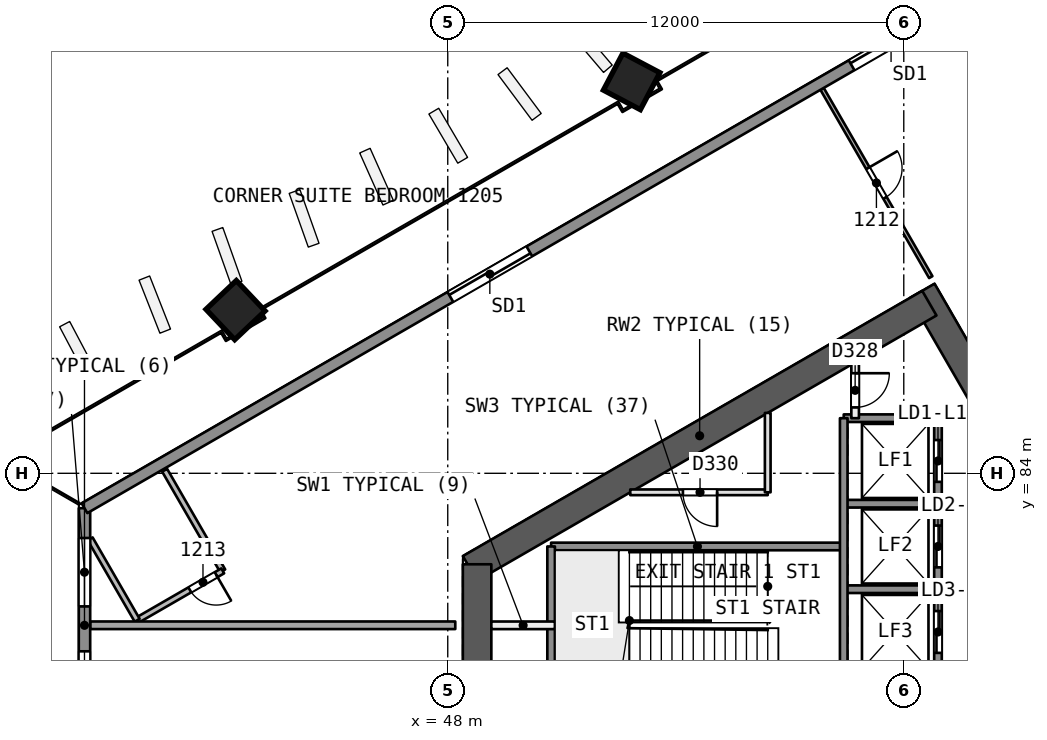
"""IFC4 building model, lengths in metres.
Left out: names, types, materials, properties, quantities, classifications, styles, units other than length and angle.
Written with IfcOpenShell. Run it as: python <this file> out.ifc"""

import sys

from ifc_helpers import new_model, si_unit, direction, frame, frame_2d, origin, origin_2d, place, context, subcontext, project, spatial, rectangle, extrude, element, fill, save


model = new_model("IFC4")
c1 = context("Model", 3, precision=1e-05, world=origin(), true_north=direction((0.0, 1.0)))
c2 = subcontext(c1, "Body", "Model", "MODEL_VIEW")
j1 = project(units=[si_unit("LENGTHUNIT", "METRE"), si_unit("PLANEANGLEUNIT", "RADIAN")], contexts=[c1])
p1 = place(None, origin())
s1 = spatial("IfcSite", under=j1, at=p1, CompositionType="ELEMENT")
p2 = place(p1, origin())
s2 = spatial("IfcBuilding", under=s1, at=p2, CompositionType="ELEMENT")
p3 = place(p2, frame((0.0, 0.0, 57.3)))
s3 = spatial("IfcBuildingStorey", under=s2, at=p3, CompositionType="ELEMENT", Elevation=57.3)
p4 = place(p3, frame((65.567, 80.0, 0.0), z_axis=(0.0, 0.0, 1.0), x_axis=(-0.499988615364, 0.866031976607, 0.0)))
e1 = element("IfcWall", 1, at=p4, inside=s3, PredefinedType="SHEAR", context=c2, shape_type="SweptSolid", body=[
    extrude(rectangle(XDim=10.163, YDim=0.75, at=frame_2d((5.082, 0.0))), origin(), (0.0, 0.0, 1.0), 3.7),
])
p5 = place(p4, frame((0.733, 0.0, 0.0)))
e2 = element("IfcOpeningElement", 2, at=p5, cuts=e1, PredefinedType="OPENING", context=c2, shape_type="SweptSolid", body=[
    extrude(rectangle(XDim=1.2, YDim=2.1, at=frame_2d((0.6, 1.05))), frame((0.0, 0.385, 0.0), z_axis=(0.0, -1.0, 0.0), x_axis=(1.0, 0.0, 0.0)), (0.0, 0.0, 1.0), 0.771),
])
p6 = place(p3, frame((60.673, 88.477, 0.0), z_axis=(0.0, 0.0, 1.0), x_axis=(-0.8660248072, -0.500001033313, 0.0)))
e3 = element("IfcWall", 3, at=p6, inside=s3, PredefinedType="SHEAR", context=c2, shape_type="SweptSolid", body=[
    extrude(rectangle(XDim=13.958, YDim=0.75, at=frame_2d((6.979, 0.0))), origin(), (0.0, 0.0, 1.0), 3.7),
])
p7 = place(p3, frame((48.772, 81.606, 0.0), z_axis=(0.0, 0.0, 1.0), x_axis=(0.0, -1.0, 0.0)))
e4 = element("IfcWall", 4, at=p7, inside=s3, PredefinedType="SHEAR", context=c2, shape_type="SweptSolid", body=[
    extrude(rectangle(XDim=3.429, YDim=0.75, at=frame_2d((1.714, 0.0))), origin(), (0.0, 0.0, 1.0), 3.7),
])
p8 = place(p3, frame((60.673, 71.523, 0.0), z_axis=(0.0, 0.0, 1.0), x_axis=(0.499997052475, 0.866027105532, 0.0)))
e5 = element("IfcWall", 5, at=p8, inside=s3, PredefinedType="SHEAR", context=c2, shape_type="SweptSolid", body=[
    extrude(rectangle(XDim=10.005, YDim=0.75, at=frame_2d((5.002, 0.0))), origin(), (0.0, 0.0, 1.0), 3.7),
])
p9 = place(p8, frame((7.855, 0.0, 0.0)))
e6 = element("IfcOpeningElement", 6, at=p9, cuts=e5, PredefinedType="OPENING", context=c2, shape_type="SweptSolid", body=[
    extrude(rectangle(XDim=1.2, YDim=2.1, at=frame_2d((0.6, 1.05))), frame((0.0, 0.385, 0.0), z_axis=(0.0, -1.0, 0.0), x_axis=(1.0, 0.0, 0.0)), (0.0, 0.0, 1.0), 0.771),
])
p10 = place(p3, frame((52.816, 94.326, 0.0), z_axis=(0.019328516974, -0.012138044789, 0.999739504221), x_axis=(-0.500205614953, 0.865671455024, 0.020181048691)))
e7 = element("IfcColumn", 7, at=p10, inside=s3, PredefinedType="COLUMN", context=c2, shape_type="SweptSolid", body=[
    extrude(rectangle(XDim=1.1, YDim=1.1, at=origin_2d()), origin(), (0.0, 0.0, 1.0), 3.701),
])
p11 = place(p3, frame((42.381, 88.302, 0.0), z_axis=(0.028559101991, -0.006859460986, 0.999568569678), x_axis=(-0.498513358127, 0.866646856607, 0.020190534949)))
e8 = element("IfcColumn", 8, at=p11, inside=s3, PredefinedType="COLUMN", context=c2, shape_type="SweptSolid", body=[
    extrude(rectangle(XDim=1.1, YDim=1.1, at=origin_2d()), origin(), (0.0, 0.0, 1.0), 3.702),
])
p12 = place(p3, frame((61.63, 96.298, 0.0), z_axis=(0.0, 0.0, 1.0), x_axis=(0.500001153704, -0.866024737692, 0.0)))
e9 = element("IfcWall", 9, at=p12, inside=s3, PredefinedType="PARTITIONING", context=c2, shape_type="SweptSolid", body=[
    extrude(rectangle(XDim=13.7, YDim=0.2, at=frame_2d((6.85, 0.0))), origin(), (0.0, 0.0, 1.0), 3.2),
])
p13 = place(p3, frame((57.85, 94.116, 0.0), z_axis=(0.0, 0.0, 1.0), x_axis=(0.499994590374, -0.866028527011, 0.0)))
e10 = element("IfcWall", 10, at=p13, inside=s3, PredefinedType="PARTITIONING", context=c2, shape_type="SweptSolid", body=[
    extrude(rectangle(XDim=5.721, YDim=0.1, at=frame_2d((2.86, 0.0))), origin(), (0.0, 0.0, 1.0), 3.2),
])
p14 = place(p13, frame((2.41, 0.0, 0.0)))
e11 = element("IfcOpeningElement", 11, at=p14, cuts=e10, PredefinedType="OPENING", context=c2, shape_type="SweptSolid", body=[
    extrude(rectangle(XDim=0.9, YDim=2.1, at=frame_2d((0.45, 1.05))), frame((0.0, 0.061, 0.0), z_axis=(0.0, -1.0, 0.0), x_axis=(1.0, 0.0, 0.0)), (0.0, 0.0, 1.0), 0.121),
])
p15 = place(p3, frame((40.55, 84.081, 0.0), z_axis=(0.0, 0.0, 1.0), x_axis=(0.499978218965, -0.866037978706, 0.0)))
e12 = element("IfcWall", 12, at=p15, inside=s3, PredefinedType="PARTITIONING", context=c2, shape_type="SweptSolid", body=[
    extrude(rectangle(XDim=3.057, YDim=0.15, at=frame_2d((1.529, 0.0))), origin(), (0.0, 0.0, 1.0), 3.2),
])
p16 = place(p3, frame((42.079, 81.433, 0.0), z_axis=(0.0, 0.0, 1.0), x_axis=(-0.865997922154, -0.500047596559, 0.0)))
e13 = element("IfcWall", 13, at=p16, inside=s3, PredefinedType="PARTITIONING", context=c2, shape_type="SweptSolid", body=[
    extrude(rectangle(XDim=2.6, YDim=0.15, at=frame_2d((1.3, 0.0))), origin(), (0.0, 0.0, 1.0), 3.2),
])
p17 = place(p16, frame((0.2, 0.0, 0.0)))
e14 = element("IfcOpeningElement", 14, at=p17, cuts=e13, PredefinedType="OPENING", context=c2, shape_type="SweptSolid", body=[
    extrude(rectangle(XDim=0.8, YDim=2.1, at=frame_2d((0.4, 1.05))), frame((0.0, 0.085, 0.0), z_axis=(0.0, -1.0, 0.0), x_axis=(1.0, 0.0, 0.0)), (0.0, 0.0, 1.0), 0.171),
])
p18 = place(p3, frame((39.827, 80.133, 0.0), z_axis=(0.0, 0.0, 1.0), x_axis=(-0.500001430823, 0.866024577697, 0.0)))
e15 = element("IfcWall", 15, at=p18, inside=s3, PredefinedType="PARTITIONING", context=c2, shape_type="SweptSolid", body=[
    extrude(rectangle(XDim=2.475, YDim=0.15, at=frame_2d((1.237, 0.0))), origin(), (0.0, 0.0, 1.0), 3.2),
])
p19 = place(p3, frame((38.59, 80.001, 0.0), z_axis=(0.0, 0.0, 1.0), x_axis=(1.0, 0.0, 0.0)))
e16 = element("IfcWall", 16, at=p19, inside=s3, PredefinedType="PARTITIONING", context=c2, shape_type="SweptSolid", body=[
    extrude(rectangle(XDim=9.608, YDim=0.2, at=frame_2d((4.804, 0.0))), origin(), (0.0, 0.0, 1.0), 3.2),
])
p20 = place(p3, frame((38.441, 76.918, 0.0), z_axis=(0.0, 0.0, 1.0), x_axis=(0.0, 1.0, 0.0)))
e17 = element("IfcWall", 17, at=p20, inside=s3, PredefinedType="SOLIDWALL", context=c2, shape_type="SweptSolid", body=[
    extrude(rectangle(XDim=6.165, YDim=0.3, at=frame_2d((3.082, 0.0))), origin(), (0.0, 0.0, 1.0), 3.2),
])
p21 = place(p20, frame((3.58, 0.0, 0.9)))
e18 = element("IfcOpeningElement", 18, at=p21, cuts=e17, PredefinedType="OPENING", context=c2, shape_type="SweptSolid", body=[
    extrude(rectangle(XDim=1.8, YDim=1.5, at=frame_2d((0.9, 0.75))), frame((0.0, 0.161, 0.0), z_axis=(0.0, -1.0, 0.0), x_axis=(1.0, 0.0, 0.0)), (0.0, 0.0, 1.0), 0.321),
])
p22 = place(p20, frame((0.598, 0.0, 0.9)))
e19 = element("IfcOpeningElement", 19, at=p22, cuts=e17, PredefinedType="OPENING", context=c2, shape_type="SweptSolid", body=[
    extrude(rectangle(XDim=1.8, YDim=1.5, at=frame_2d((0.9, 0.75))), frame((0.0, 0.161, 0.0), z_axis=(0.0, -1.0, 0.0), x_axis=(1.0, 0.0, 0.0)), (0.0, 0.0, 1.0), 0.321),
])
p23 = place(p3, frame((38.441, 83.082, 0.0), z_axis=(0.0, 0.0, 1.0), x_axis=(0.866026578911, 0.499997964616, 0.0)))
e20 = element("IfcWall", 20, at=p23, inside=s3, PredefinedType="SOLIDWALL", context=c2, shape_type="SweptSolid", body=[
    extrude(rectangle(XDim=60.24, YDim=0.3, at=frame_2d((30.12, 0.0))), origin(), (0.0, 0.0, 1.0), 3.2),
])
p24 = place(p23, frame((28.141, 0.0, 0.0)))
e21 = element("IfcOpeningElement", 21, at=p24, cuts=e20, PredefinedType="OPENING", context=c2, shape_type="SweptSolid", body=[
    extrude(rectangle(XDim=2.4, YDim=2.4, at=frame_2d((1.2, 1.2))), frame((0.0, 0.161, 0.0), z_axis=(0.0, -1.0, 0.0), x_axis=(1.0, 0.0, 0.0)), (0.0, 0.0, 1.0), 0.321),
])
p25 = place(p23, frame((33.752, 0.0, 0.0)))
e22 = element("IfcOpeningElement", 22, at=p25, cuts=e20, PredefinedType="OPENING", context=c2, shape_type="SweptSolid", body=[
    extrude(rectangle(XDim=2.4, YDim=2.4, at=frame_2d((1.2, 1.2))), frame((0.0, 0.161, 0.0), z_axis=(0.0, -1.0, 0.0), x_axis=(1.0, 0.0, 0.0)), (0.0, 0.0, 1.0), 0.321),
])
p26 = place(p23, frame((46.722, 0.0, 0.0)))
e23 = element("IfcOpeningElement", 23, at=p26, cuts=e20, PredefinedType="OPENING", context=c2, shape_type="SweptSolid", body=[
    extrude(rectangle(XDim=2.4, YDim=2.4, at=frame_2d((1.2, 1.2))), frame((0.0, 0.161, 0.0), z_axis=(0.0, -1.0, 0.0), x_axis=(1.0, 0.0, 0.0)), (0.0, 0.0, 1.0), 0.321),
])
p27 = place(p23, frame((23.308, 0.0, 0.0)))
e24 = element("IfcOpeningElement", 24, at=p27, cuts=e20, PredefinedType="OPENING", context=c2, shape_type="SweptSolid", body=[
    extrude(rectangle(XDim=2.4, YDim=2.4, at=frame_2d((1.2, 1.2))), frame((0.0, 0.161, 0.0), z_axis=(0.0, -1.0, 0.0), x_axis=(1.0, 0.0, 0.0)), (0.0, 0.0, 1.0), 0.321),
])
p28 = place(p23, frame((11.117, 0.0, 0.0)))
e25 = element("IfcOpeningElement", 25, at=p28, cuts=e20, PredefinedType="OPENING", context=c2, shape_type="SweptSolid", body=[
    extrude(rectangle(XDim=2.4, YDim=2.4, at=frame_2d((1.2, 1.2))), frame((0.0, 0.161, 0.0), z_axis=(0.0, -1.0, 0.0), x_axis=(1.0, 0.0, 0.0)), (0.0, 0.0, 1.0), 0.321),
])
p29 = place(p3, frame((60.9, 85.45, 0.0), z_axis=(0.0, 0.0, 1.0), x_axis=(-1.0, 0.0, 0.0)))
e26 = element("IfcWall", 26, at=p29, inside=s3, PredefinedType="SOLIDWALL", context=c2, shape_type="SweptSolid", body=[
    extrude(rectangle(XDim=2.48, YDim=0.2, at=frame_2d((1.24, 0.0))), origin(), (0.0, 0.0, 1.0), 3.2),
])
p30 = place(p3, frame((56.42, 83.5, 0.0), z_axis=(0.0, 0.0, 1.0), x_axis=(-1.0, 0.0, 0.0)))
e27 = element("IfcWall", 27, at=p30, inside=s3, PredefinedType="PARTITIONING", context=c2, shape_type="SweptSolid", body=[
    extrude(rectangle(XDim=3.618, YDim=0.15, at=frame_2d((1.809, 0.0))), origin(), (0.0, 0.0, 1.0), 3.2),
])
p31 = place(p30, frame((1.332, 0.0, 0.0)))
e28 = element("IfcOpeningElement", 28, at=p31, cuts=e27, PredefinedType="OPENING", context=c2, shape_type="SweptSolid", body=[
    extrude(rectangle(XDim=0.9, YDim=2.1, at=frame_2d((0.45, 1.05))), frame((0.0, 0.085, 0.0), z_axis=(0.0, -1.0, 0.0), x_axis=(1.0, 0.0, 0.0)), (0.0, 0.0, 1.0), 0.171),
])
p32 = place(p3, frame((60.9, 83.2, 0.0), z_axis=(0.0, 0.0, 1.0), x_axis=(-1.0, 0.0, 0.0)))
e29 = element("IfcWall", 29, at=p32, inside=s3, PredefinedType="SOLIDWALL", context=c2, shape_type="SweptSolid", body=[
    extrude(rectangle(XDim=2.48, YDim=0.2, at=frame_2d((1.24, 0.0))), origin(), (0.0, 0.0, 1.0), 3.2),
])
p33 = place(p3, frame((58.42, 82.075, 0.0), z_axis=(0.0, 0.0, 1.0), x_axis=(-1.0, 0.0, 0.0)))
e30 = element("IfcWall", 30, at=p33, inside=s3, PredefinedType="SOLIDWALL", context=c2, shape_type="SweptSolid", body=[
    extrude(rectangle(XDim=7.7, YDim=0.2, at=frame_2d((3.85, 0.0))), origin(), (0.0, 0.0, 1.0), 3.2),
])
p34 = place(p3, frame((60.9, 80.95, 0.0), z_axis=(0.0, 0.0, 1.0), x_axis=(-1.0, 0.0, 0.0)))
e31 = element("IfcWall", 31, at=p34, inside=s3, PredefinedType="SOLIDWALL", context=c2, shape_type="SweptSolid", body=[
    extrude(rectangle(XDim=2.48, YDim=0.2, at=frame_2d((1.24, 0.0))), origin(), (0.0, 0.0, 1.0), 3.2),
])
p35 = place(p3, frame((50.82, 80.0, 0.0), z_axis=(0.0, 0.0, 1.0), x_axis=(-1.0, 0.0, 0.0)))
e32 = element("IfcWall", 32, at=p35, inside=s3, PredefinedType="PARTITIONING", context=c2, shape_type="SweptSolid", body=[
    extrude(rectangle(XDim=1.673, YDim=0.2, at=frame_2d((0.836, 0.0))), origin(), (0.0, 0.0, 1.0), 3.2),
])
p36 = place(p3, frame((60.9, 85.45, 0.0), z_axis=(0.0, 0.0, 1.0), x_axis=(0.0, -1.0, 0.0)))
e33 = element("IfcWall", 33, at=p36, inside=s3, PredefinedType="SOLIDWALL", context=c2, shape_type="SweptSolid", body=[
    extrude(rectangle(XDim=10.9, YDim=0.2, at=frame_2d((5.45, 0.0))), origin(), (0.0, 0.0, 1.0), 3.2),
])
p37 = place(p36, frame((0.575, 0.0, 0.0)))
e34 = element("IfcOpeningElement", 34, at=p37, cuts=e33, PredefinedType="OPENING", context=c2, shape_type="SweptSolid", body=[
    extrude(rectangle(XDim=1.1, YDim=2.1, at=frame_2d((0.55, 1.05))), frame((0.0, 0.11, 0.0), z_axis=(0.0, -1.0, 0.0), x_axis=(1.0, 0.0, 0.0)), (0.0, 0.0, 1.0), 0.221),
])
p38 = place(p36, frame((2.825, 0.0, 0.0)))
e35 = element("IfcOpeningElement", 35, at=p38, cuts=e33, PredefinedType="OPENING", context=c2, shape_type="SweptSolid", body=[
    extrude(rectangle(XDim=1.1, YDim=2.1, at=frame_2d((0.55, 1.05))), frame((0.0, 0.11, 0.0), z_axis=(0.0, -1.0, 0.0), x_axis=(1.0, 0.0, 0.0)), (0.0, 0.0, 1.0), 0.221),
])
p39 = place(p36, frame((5.075, 0.0, 0.0)))
e36 = element("IfcOpeningElement", 36, at=p39, cuts=e33, PredefinedType="OPENING", context=c2, shape_type="SweptSolid", body=[
    extrude(rectangle(XDim=1.1, YDim=2.1, at=frame_2d((0.55, 1.05))), frame((0.0, 0.11, 0.0), z_axis=(0.0, -1.0, 0.0), x_axis=(1.0, 0.0, 0.0)), (0.0, 0.0, 1.0), 0.221),
])
p40 = place(p36, frame((7.325, 0.0, 0.0)))
e37 = element("IfcOpeningElement", 37, at=p40, cuts=e33, PredefinedType="OPENING", context=c2, shape_type="SweptSolid", body=[
    extrude(rectangle(XDim=1.1, YDim=2.1, at=frame_2d((0.55, 1.05))), frame((0.0, 0.11, 0.0), z_axis=(0.0, -1.0, 0.0), x_axis=(1.0, 0.0, 0.0)), (0.0, 0.0, 1.0), 0.221),
])
p41 = place(p3, frame((58.72, 86.917, 0.0), z_axis=(0.0, 0.0, 1.0), x_axis=(0.0, -1.0, 0.0)))
e38 = element("IfcWall", 38, at=p41, inside=s3, PredefinedType="PARTITIONING", context=c2, shape_type="SweptSolid", body=[
    extrude(rectangle(XDim=1.467, YDim=0.2, at=frame_2d((0.733, 0.0))), origin(), (0.0, 0.0, 1.0), 3.2),
])
p42 = place(p41, frame((0.283, 0.0, 0.0)))
e39 = element("IfcOpeningElement", 39, at=p42, cuts=e38, PredefinedType="OPENING", context=c2, shape_type="SweptSolid", body=[
    extrude(rectangle(XDim=0.9, YDim=2.1, at=frame_2d((0.45, 1.05))), frame((0.0, 0.11, 0.0), z_axis=(0.0, -1.0, 0.0), x_axis=(1.0, 0.0, 0.0)), (0.0, 0.0, 1.0), 0.221),
])
p43 = place(p3, frame((58.42, 85.45, 0.0), z_axis=(0.0, 0.0, 1.0), x_axis=(0.0, -1.0, 0.0)))
e40 = element("IfcWall", 40, at=p43, inside=s3, PredefinedType="SOLIDWALL", context=c2, shape_type="SweptSolid", body=[
    extrude(rectangle(XDim=9.0, YDim=0.2, at=frame_2d((4.5, 0.0))), origin(), (0.0, 0.0, 1.0), 3.2),
])
p44 = place(p3, frame((56.42, 85.589, 0.0), z_axis=(0.0, 0.0, 1.0), x_axis=(0.0, -1.0, 0.0)))
e41 = element("IfcWall", 41, at=p44, inside=s3, PredefinedType="PARTITIONING", context=c2, shape_type="SweptSolid", body=[
    extrude(rectangle(XDim=2.089, YDim=0.15, at=frame_2d((1.044, 0.0))), origin(), (0.0, 0.0, 1.0), 3.2),
])
p45 = place(p3, frame((50.72, 82.075, 0.0), z_axis=(0.0, 0.0, 1.0), x_axis=(0.0, -1.0, 0.0)))
e42 = element("IfcWall", 42, at=p45, inside=s3, PredefinedType="SOLIDWALL", context=c2, shape_type="SweptSolid", body=[
    extrude(rectangle(XDim=4.15, YDim=0.2, at=frame_2d((2.075, 0.0))), origin(), (0.0, 0.0, 1.0), 3.2),
])
p46 = place(p14, origin())
e43 = element("IfcDoor", 43, at=p46, inside=s3, OperationType="SINGLE_SWING_LEFT", PredefinedType="NOTDEFINED", context=c2, shape_type="SweptSolid", body=[
    extrude(rectangle(XDim=0.9, YDim=2.1, at=frame_2d((0.45, 1.05))), frame((0.0, 0.025, 0.0), z_axis=(0.0, -1.0, 0.0), x_axis=(1.0, 0.0, 0.0)), (0.0, 0.0, 1.0), 0.05),
])
fill(e11, e43)
p47 = place(p17, origin())
e44 = element("IfcDoor", 44, at=p47, inside=s3, OperationType="SINGLE_SWING_LEFT", PredefinedType="NOTDEFINED", context=c2, shape_type="SweptSolid", body=[
    extrude(rectangle(XDim=0.8, YDim=2.1, at=frame_2d((0.4, 1.05))), frame((0.0, 0.025, 0.0), z_axis=(0.0, -1.0, 0.0), x_axis=(1.0, 0.0, 0.0)), (0.0, 0.0, 1.0), 0.05),
])
fill(e14, e44)
p48 = place(p21, origin())
e45 = element("IfcWindow", 45, at=p48, inside=s3, PartitioningType="SINGLE_PANEL", PredefinedType="WINDOW", context=c2, shape_type="SweptSolid", body=[
    extrude(rectangle(XDim=1.8, YDim=1.5, at=frame_2d((0.9, 0.75))), frame((0.0, 0.03, 0.0), z_axis=(0.0, -1.0, 0.0), x_axis=(1.0, 0.0, 0.0)), (0.0, 0.0, 1.0), 0.06),
])
fill(e18, e45)
p49 = place(p22, origin())
e46 = element("IfcWindow", 46, at=p49, inside=s3, PartitioningType="SINGLE_PANEL", PredefinedType="WINDOW", context=c2, shape_type="SweptSolid", body=[
    extrude(rectangle(XDim=1.8, YDim=1.5, at=frame_2d((0.9, 0.75))), frame((0.0, 0.03, 0.0), z_axis=(0.0, -1.0, 0.0), x_axis=(1.0, 0.0, 0.0)), (0.0, 0.0, 1.0), 0.06),
])
fill(e19, e46)
p50 = place(p27, origin())
e47 = element("IfcDoor", 47, at=p50, inside=s3, OperationType="SLIDING_TO_RIGHT", PredefinedType="NOTDEFINED", context=c2, shape_type="SweptSolid", body=[
    extrude(rectangle(XDim=2.4, YDim=2.4, at=frame_2d((1.2, 1.2))), frame((0.0, 0.025, 0.0), z_axis=(0.0, -1.0, 0.0), x_axis=(1.0, 0.0, 0.0)), (0.0, 0.0, 1.0), 0.05),
])
fill(e24, e47)
p51 = place(p28, origin())
e48 = element("IfcDoor", 48, at=p51, inside=s3, OperationType="SLIDING_TO_LEFT", PredefinedType="NOTDEFINED", context=c2, shape_type="SweptSolid", body=[
    extrude(rectangle(XDim=2.4, YDim=2.4, at=frame_2d((1.2, 1.2))), frame((0.0, 0.025, 0.0), z_axis=(0.0, -1.0, 0.0), x_axis=(1.0, 0.0, 0.0)), (0.0, 0.0, 1.0), 0.05),
])
fill(e25, e48)
p52 = place(p37, origin())
e49 = element("IfcDoor", 49, at=p52, inside=s3, OperationType="SLIDING_TO_RIGHT", PredefinedType="NOTDEFINED", context=c2, shape_type="SweptSolid", body=[
    extrude(rectangle(XDim=1.1, YDim=2.1, at=frame_2d((0.55, 1.05))), frame((0.0, 0.025, 0.0), z_axis=(0.0, -1.0, 0.0), x_axis=(1.0, 0.0, 0.0)), (0.0, 0.0, 1.0), 0.05),
])
fill(e34, e49)
p53 = place(p38, origin())
e50 = element("IfcDoor", 50, at=p53, inside=s3, OperationType="SLIDING_TO_LEFT", PredefinedType="NOTDEFINED", context=c2, shape_type="SweptSolid", body=[
    extrude(rectangle(XDim=1.1, YDim=2.1, at=frame_2d((0.55, 1.05))), frame((0.0, 0.025, 0.0), z_axis=(0.0, -1.0, 0.0), x_axis=(1.0, 0.0, 0.0)), (0.0, 0.0, 1.0), 0.05),
])
fill(e35, e50)
p54 = place(p39, origin())
e51 = element("IfcDoor", 51, at=p54, inside=s3, OperationType="SLIDING_TO_RIGHT", PredefinedType="NOTDEFINED", context=c2, shape_type="SweptSolid", body=[
    extrude(rectangle(XDim=1.1, YDim=2.1, at=frame_2d((0.55, 1.05))), frame((0.0, 0.025, 0.0), z_axis=(0.0, -1.0, 0.0), x_axis=(1.0, 0.0, 0.0)), (0.0, 0.0, 1.0), 0.05),
])
fill(e36, e51)
p55 = place(p42, origin())
e52 = element("IfcDoor", 52, at=p55, inside=s3, OperationType="SINGLE_SWING_LEFT", PredefinedType="NOTDEFINED", context=c2, shape_type="SweptSolid", body=[
    extrude(rectangle(XDim=0.9, YDim=2.1, at=frame_2d((0.45, 1.05))), frame((0.0, 0.025, 0.0), z_axis=(0.0, -1.0, 0.0), x_axis=(1.0, 0.0, 0.0)), (0.0, 0.0, 1.0), 0.05),
])
fill(e39, e52)
p56 = place(p31, origin())
e53 = element("IfcDoor", 53, at=p56, inside=s3, OperationType="SINGLE_SWING_LEFT", PredefinedType="NOTDEFINED", context=c2, shape_type="SweptSolid", body=[
    extrude(rectangle(XDim=0.9, YDim=2.1, at=frame_2d((0.45, 1.05))), frame((0.0, 0.025, 0.0), z_axis=(0.0, -1.0, 0.0), x_axis=(1.0, 0.0, 0.0)), (0.0, 0.0, 1.0), 0.05),
])
fill(e28, e53)
save(model, sys.argv[1])
